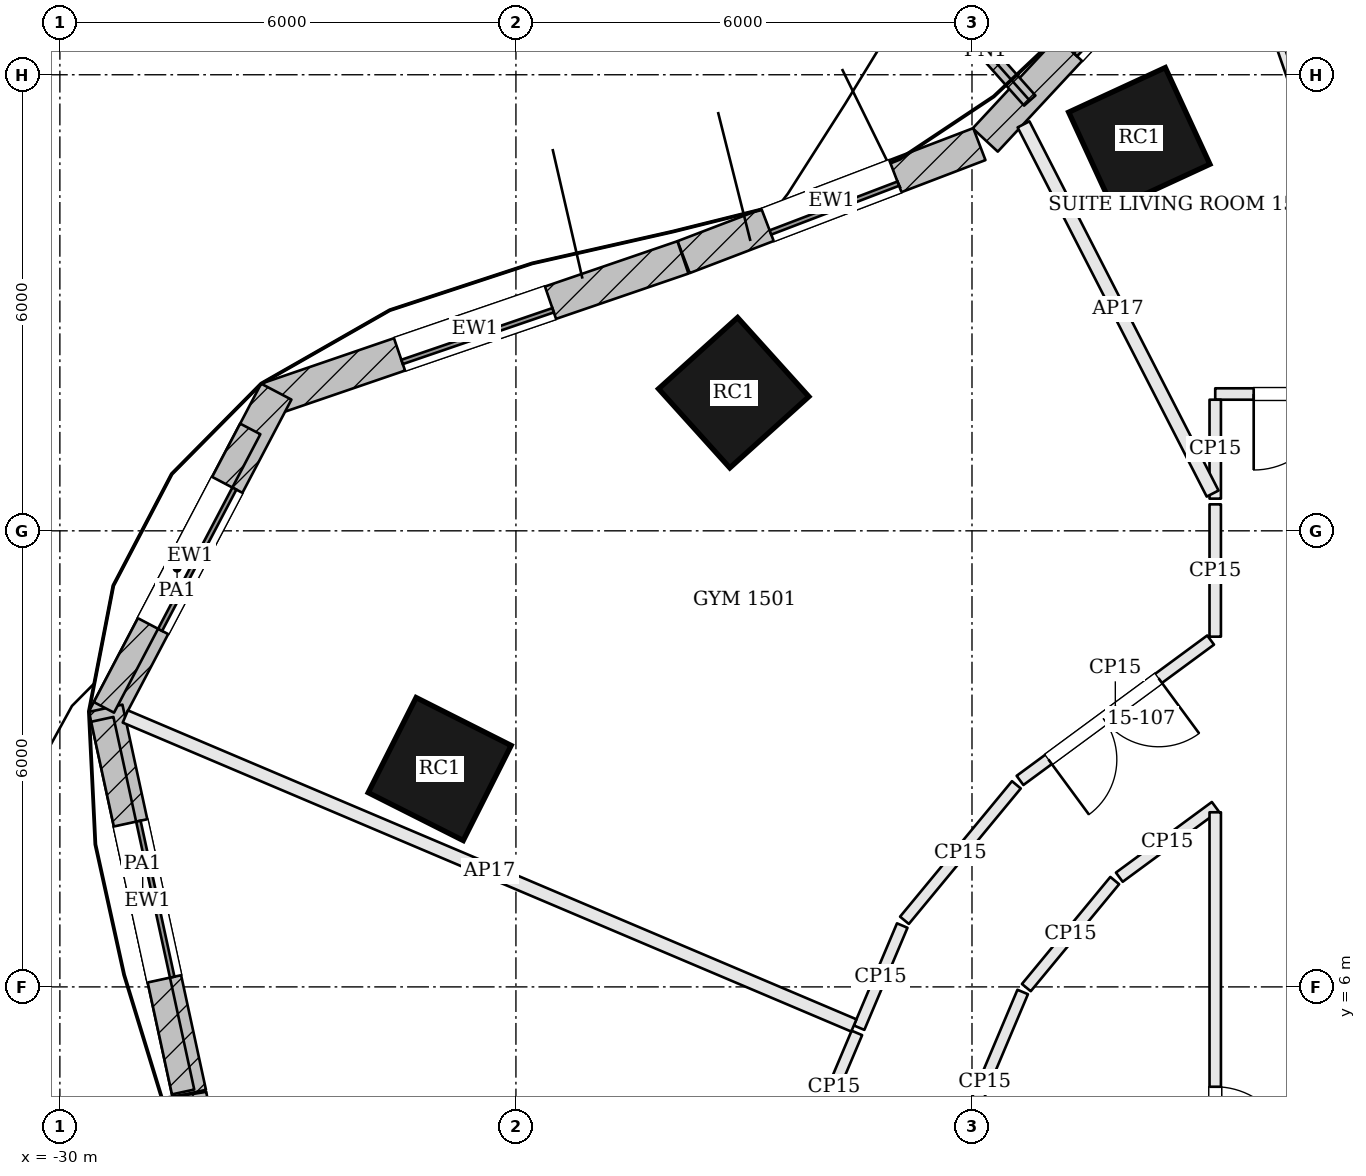
"""IFC4 building model, lengths in metres.
Left out: names, types, materials, properties, quantities, classifications, styles, units other than length and angle.
Written with IfcOpenShell. Run it as: python <this file> out.ifc"""

import sys

from ifc_helpers import new_model, si_unit, direction, frame, frame_2d, origin, origin_2d, place, context, subcontext, project, spatial, rectangle, extrude, element, fill, save


model = new_model("IFC4")
c1 = context("Model", 3, precision=1e-05, world=origin(), true_north=direction((0.0, 1.0)))
c2 = subcontext(c1, "Body", "Model", "MODEL_VIEW")
j1 = project(units=[si_unit("LENGTHUNIT", "METRE"), si_unit("PLANEANGLEUNIT", "RADIAN")], contexts=[c1])
p1 = place(None, origin())
s1 = spatial("IfcSite", under=j1, at=p1, CompositionType="ELEMENT")
p2 = place(p1, origin())
s2 = spatial("IfcBuilding", under=s1, at=p2, CompositionType="ELEMENT")
p3 = place(p2, frame((0.0, 0.0, 69.9)))
s3 = spatial("IfcBuildingStorey", under=s2, at=p3, CompositionType="ELEMENT", Elevation=69.9)
for number, where, z_axis, x_axis in (
    (1, (-15.799, 17.165, 0.0), (0.0, 0.0, 1.0), (-0.908, -0.419, 0.0)),
    (2, (-21.135, 13.817, 0.0), (0.0, 0.0, 1.0), (-0.743, -0.67, 0.0)),
    (3, (-25.003, 8.866, 0.0), (0.0, 0.0, 1.0), (-0.45, -0.893, 0.0)),
):
    element("IfcColumn", number, at=place(p3, frame(where, z_axis=z_axis, x_axis=x_axis)), inside=s3, PredefinedType="COLUMN", context=c2, shape_type="SweptSolid", body=[
        extrude(rectangle(XDim=1.4, YDim=1.4, at=origin_2d()), origin(), (0.0, 0.0, 1.0), 3.6),
    ])
p4 = place(p3, frame((-14.177, 21.066, 0.0), z_axis=(0.0, 0.0, 1.0), x_axis=(-0.680847709714, -0.732425010617, 0.0)))
e4 = element("IfcWall", 4, at=p4, inside=s3, PredefinedType="SOLIDWALL", context=c2, shape_type="SweptSolid", body=[
    extrude(rectangle(XDim=5.358, YDim=0.45, at=frame_2d((2.679, 0.0))), origin(), (0.0, 0.0, 1.0), 3.4),
])
p5 = place(p4, frame((1.629, 0.0, 0.9)))
e5 = element("IfcOpeningElement", 5, at=p5, cuts=e4, PredefinedType="OPENING", context=c2, shape_type="SweptSolid", body=[
    extrude(rectangle(XDim=2.1, YDim=2.0, at=frame_2d((1.05, 1.0))), frame((0.0, 0.235, 0.0), z_axis=(0.0, -1.0, 0.0), x_axis=(1.0, 0.0, 0.0)), (0.0, 0.0, 1.0), 0.47),
])
p6 = place(p3, frame((-17.903, 17.087, 0.0), z_axis=(0.0, 0.0, 1.0), x_axis=(-0.934145554025, -0.356892258105, 0.0)))
e6 = element("IfcWall", 6, at=p6, inside=s3, PredefinedType="SOLIDWALL", context=c2, shape_type="SweptSolid", body=[
    extrude(rectangle(XDim=4.165, YDim=0.45, at=frame_2d((2.082, 0.0))), origin(), (0.0, 0.0, 1.0), 3.4),
])
p7 = place(p6, frame((1.182, 0.0, 0.9)))
e7 = element("IfcOpeningElement", 7, at=p7, cuts=e6, PredefinedType="OPENING", context=c2, shape_type="SweptSolid", body=[
    extrude(rectangle(XDim=1.8, YDim=2.0, at=frame_2d((0.9, 1.0))), frame((0.0, 0.235, 0.0), z_axis=(0.0, -1.0, 0.0), x_axis=(1.0, 0.0, 0.0)), (0.0, 0.0, 1.0), 0.47),
])
p8 = place(p3, frame((-21.803, 15.597, 0.0), z_axis=(0.0, 0.0, 1.0), x_axis=(-0.946115314877, -0.323829910532, 0.0)))
e8 = element("IfcWall", 8, at=p8, inside=s3, PredefinedType="SOLIDWALL", context=c2, shape_type="SweptSolid", body=[
    extrude(rectangle(XDim=5.782, YDim=0.45, at=frame_2d((2.891, 0.0))), origin(), (0.0, 0.0, 1.0), 3.4),
])
p9 = place(p8, frame((1.841, 0.0, 0.9)))
e9 = element("IfcOpeningElement", 9, at=p9, cuts=e8, PredefinedType="OPENING", context=c2, shape_type="SweptSolid", body=[
    extrude(rectangle(XDim=2.1, YDim=2.0, at=frame_2d((1.05, 1.0))), frame((0.0, 0.235, 0.0), z_axis=(0.0, -1.0, 0.0), x_axis=(1.0, 0.0, 0.0)), (0.0, 0.0, 1.0), 0.47),
])
p10 = place(p3, frame((-27.153, 13.831, 0.0), z_axis=(0.0, 0.0, 1.0), x_axis=(-0.465165872942, -0.885223537108, 0.0)))
e10 = element("IfcWall", 10, at=p10, inside=s3, PredefinedType="SOLIDWALL", context=c2, shape_type="SweptSolid", body=[
    extrude(rectangle(XDim=4.871, YDim=0.45, at=frame_2d((2.436, 0.0))), origin(), (0.0, 0.0, 1.0), 3.4),
])
p11 = place(p10, frame((1.385, 0.0, 0.9)))
e11 = element("IfcOpeningElement", 11, at=p11, cuts=e10, PredefinedType="OPENING", context=c2, shape_type="SweptSolid", body=[
    extrude(rectangle(XDim=2.1, YDim=2.0, at=frame_2d((1.05, 1.0))), frame((0.0, 0.235, 0.0), z_axis=(0.0, -1.0, 0.0), x_axis=(1.0, 0.0, 0.0)), (0.0, 0.0, 1.0), 0.47),
])
p12 = place(p3, frame((-29.397, 9.666, 0.0), z_axis=(0.0, 0.0, 1.0), x_axis=(0.211962455994, -0.977277809657, 0.0)))
e12 = element("IfcWall", 12, at=p12, inside=s3, PredefinedType="SOLIDWALL", context=c2, shape_type="SweptSolid", body=[
    extrude(rectangle(XDim=5.186, YDim=0.45, at=frame_2d((2.593, 0.0))), origin(), (0.0, 0.0, 1.0), 3.4),
])
p13 = place(p12, frame((1.543, 0.0, 0.9)))
e13 = element("IfcOpeningElement", 13, at=p13, cuts=e12, PredefinedType="OPENING", context=c2, shape_type="SweptSolid", body=[
    extrude(rectangle(XDim=2.1, YDim=2.0, at=frame_2d((1.05, 1.0))), frame((0.0, 0.235, 0.0), z_axis=(0.0, -1.0, 0.0), x_axis=(1.0, 0.0, 0.0)), (0.0, 0.0, 1.0), 0.47),
])
p14 = place(p3, frame((-28.296, 4.584, 0.0), z_axis=(0.0, 0.0, 1.0), x_axis=(0.156402397796, -0.987693419014, 0.0)))
e14 = element("IfcWall", 14, at=p14, inside=s3, PredefinedType="SOLIDWALL", context=c2, shape_type="SweptSolid", body=[
    extrude(rectangle(XDim=4.276, YDim=0.45, at=frame_2d((2.138, 0.0))), origin(), (0.0, 0.0, 1.0), 3.4),
])
p15 = place(p14, frame((1.088, 0.0, 0.9)))
e15 = element("IfcOpeningElement", 15, at=p15, cuts=e14, PredefinedType="OPENING", context=c2, shape_type="SweptSolid", body=[
    extrude(rectangle(XDim=2.1, YDim=2.0, at=frame_2d((1.05, 1.0))), frame((0.0, 0.235, 0.0), z_axis=(0.0, -1.0, 0.0), x_axis=(1.0, 0.0, 0.0)), (0.0, 0.0, 1.0), 0.47),
])
p16 = place(p3, frame((-17.24, 17.66, 0.0), z_axis=(0.0, 0.0, 1.0), x_axis=(-0.664017424016, 0.747717099312, 0.0)))
e16 = element("IfcWall", 16, at=p16, inside=s3, PredefinedType="SOLIDWALL", context=c2, shape_type="SweptSolid", body=[
    extrude(rectangle(XDim=1.75, YDim=0.2, at=frame_2d((0.875, 0.0))), origin(), (0.0, 0.0, 1.0), 3.4),
])
p17 = place(p3, frame((-27.495, 13.341, 3.6), z_axis=(0.0, 0.0, 1.0), x_axis=(-0.46519687666, -0.88520724463, 0.0)))
e17 = element("IfcWall", 17, at=p17, inside=s3, PredefinedType="PARAPET", context=c2, shape_type="SweptSolid", body=[
    extrude(rectangle(XDim=4.139, YDim=0.3, at=frame_2d((2.069, 0.0))), origin(), (0.0, 0.0, 1.0), 1.1),
])
p18 = place(p3, frame((-29.442, 9.52, 3.6), z_axis=(0.0, 0.0, 1.0), x_axis=(0.211918382355, -0.977287367779, 0.0)))
e18 = element("IfcWall", 18, at=p18, inside=s3, PredefinedType="PARAPET", context=c2, shape_type="SweptSolid", body=[
    extrude(rectangle(XDim=5.016, YDim=0.3, at=frame_2d((2.508, 0.0))), origin(), (0.0, 0.0, 1.0), 1.1),
])
p19 = place(p3, frame((-28.519, 4.556, 3.6), z_axis=(0.0, 0.0, 1.0), x_axis=(0.156466543472, -0.987683259337, 0.0)))
e19 = element("IfcWall", 19, at=p19, inside=s3, PredefinedType="PARAPET", context=c2, shape_type="SweptSolid", body=[
    extrude(rectangle(XDim=1.293, YDim=0.3, at=frame_2d((0.647, 0.0))), origin(), (0.0, 0.0, 1.0), 1.1),
])
p20 = place(p3, frame((-9.594, 13.8, 0.0), z_axis=(0.0, 0.0, 1.0), x_axis=(-1.0, 0.0, 0.0)))
e20 = element("IfcWall", 20, at=p20, inside=s3, PredefinedType="PARTITIONING", context=c2, shape_type="SweptSolid", body=[
    extrude(rectangle(XDim=5.206, YDim=0.15, at=frame_2d((2.603, 0.0))), origin(), (0.0, 0.0, 1.0), 2.68),
])
p21 = place(p20, frame((3.7, 0.0, 0.0)))
e21 = element("IfcOpeningElement", 21, at=p21, cuts=e20, PredefinedType="OPENING", context=c2, shape_type="SweptSolid", body=[
    extrude(rectangle(XDim=1.0, YDim=2.1, at=frame_2d((0.5, 1.05))), frame((0.0, 0.085, 0.0), z_axis=(0.0, -1.0, 0.0), x_axis=(1.0, 0.0, 0.0)), (0.0, 0.0, 1.0), 0.17),
])
p22 = place(p3, frame((-14.8, 13.725, 0.0), z_axis=(0.0, 0.0, 1.0), x_axis=(0.0, -1.0, 0.0)))
e22 = element("IfcWall", 22, at=p22, inside=s3, PredefinedType="PARTITIONING", context=c2, shape_type="SweptSolid", body=[
    extrude(rectangle(XDim=1.302, YDim=0.15, at=frame_2d((0.651, 0.0))), origin(), (0.0, 0.0, 1.0), 2.68),
])
p23 = place(p3, frame((-17.322, 17.347, 0.0), z_axis=(0.0, 0.0, 1.0), x_axis=(0.45587154788, -0.890045578515, 0.0)))
e23 = element("IfcWall", 23, at=p23, inside=s3, PredefinedType="PARTITIONING", context=c2, shape_type="SweptSolid", body=[
    extrude(rectangle(XDim=5.457, YDim=0.175, at=frame_2d((2.729, 0.0))), origin(), (0.0, 0.0, 1.0), 2.68),
])
p24 = place(p3, frame((-14.8, 12.348, 0.0), z_axis=(0.0, 0.0, 1.0), x_axis=(0.0, -1.0, 0.0)))
e24 = element("IfcWall", 24, at=p24, inside=s3, PredefinedType="PARTITIONING", context=c2, shape_type="SweptSolid", body=[
    extrude(rectangle(XDim=1.741, YDim=0.15, at=frame_2d((0.871, 0.0))), origin(), (0.0, 0.0, 1.0), 2.68),
])
p25 = place(p3, frame((-14.861, 10.563, 0.0), z_axis=(0.0, 0.0, 1.0), x_axis=(-0.805237071219, -0.592952999094, 0.0)))
e25 = element("IfcWall", 25, at=p25, inside=s3, PredefinedType="PARTITIONING", context=c2, shape_type="SweptSolid", body=[
    extrude(rectangle(XDim=3.114, YDim=0.15, at=frame_2d((1.557, 0.0))), origin(), (0.0, 0.0, 1.0), 2.68),
])
p26 = place(p25, frame((0.85, 0.0, 0.0)))
e26 = element("IfcOpeningElement", 26, at=p26, cuts=e25, PredefinedType="OPENING", context=c2, shape_type="SweptSolid", body=[
    extrude(rectangle(XDim=1.8, YDim=2.1, at=frame_2d((0.9, 1.05))), frame((0.0, 0.085, 0.0), z_axis=(0.0, -1.0, 0.0), x_axis=(1.0, 0.0, 0.0)), (0.0, 0.0, 1.0), 0.17),
])
p27 = place(p3, frame((-17.416, 8.659, 0.0), z_axis=(0.0, 0.0, 1.0), x_axis=(-0.636865073139, -0.770975277564, 0.0)))
e27 = element("IfcWall", 27, at=p27, inside=s3, PredefinedType="PARTITIONING", context=c2, shape_type="SweptSolid", body=[
    extrude(rectangle(XDim=2.312, YDim=0.15, at=frame_2d((1.156, 0.0))), origin(), (0.0, 0.0, 1.0), 2.68),
])
p28 = place(p3, frame((-18.918, 6.807, 0.0), z_axis=(0.0, 0.0, 1.0), x_axis=(-0.38918670373, -0.921158894893, 0.0)))
e28 = element("IfcWall", 28, at=p28, inside=s3, PredefinedType="PARTITIONING", context=c2, shape_type="SweptSolid", body=[
    extrude(rectangle(XDim=1.458, YDim=0.15, at=frame_2d((0.729, 0.0))), origin(), (0.0, 0.0, 1.0), 2.68),
])
p29 = place(p3, frame((-29.139, 9.557, 0.0), z_axis=(0.0, 0.0, 1.0), x_axis=(0.920647173492, -0.390395673568, 0.0)))
e29 = element("IfcWall", 29, at=p29, inside=s3, PredefinedType="PARTITIONING", context=c2, shape_type="SweptSolid", body=[
    extrude(rectangle(XDim=10.411, YDim=0.175, at=frame_2d((5.206, 0.0))), origin(), (0.0, 0.0, 1.0), 2.68),
])
p30 = place(p3, frame((-19.514, 5.395, 0.0), z_axis=(0.0, 0.0, 1.0), x_axis=(-0.38919963173, -0.921153432747, 0.0)))
e30 = element("IfcWall", 30, at=p30, inside=s3, PredefinedType="PARTITIONING", context=c2, shape_type="SweptSolid", body=[
    extrude(rectangle(XDim=1.538, YDim=0.15, at=frame_2d((0.769, 0.0))), origin(), (0.0, 0.0, 1.0), 2.68),
])
p31 = place(p3, frame((-18.33, 3.573, 0.0), z_axis=(0.0, 0.0, 1.0), x_axis=(0.389176861346, 0.921163053207, 0.0)))
e31 = element("IfcWall", 31, at=p31, inside=s3, PredefinedType="PARTITIONING", context=c2, shape_type="SweptSolid", body=[
    extrude(rectangle(XDim=2.563, YDim=0.15, at=frame_2d((1.281, 0.0))), origin(), (0.0, 0.0, 1.0), 2.68),
])
p32 = place(p3, frame((-17.285, 5.991, 0.0), z_axis=(0.0, 0.0, 1.0), x_axis=(0.636877992195, 0.770964605581, 0.0)))
e32 = element("IfcWall", 32, at=p32, inside=s3, PredefinedType="PARTITIONING", context=c2, shape_type="SweptSolid", body=[
    extrude(rectangle(XDim=1.826, YDim=0.15, at=frame_2d((0.913, 0.0))), origin(), (0.0, 0.0, 1.0), 2.68),
])
p33 = place(p3, frame((-16.062, 7.443, 0.0), z_axis=(0.0, 0.0, 1.0), x_axis=(0.805204624788, 0.5929970592, 0.0)))
e33 = element("IfcWall", 33, at=p33, inside=s3, PredefinedType="PARTITIONING", context=c2, shape_type="SweptSolid", body=[
    extrude(rectangle(XDim=1.567, YDim=0.15, at=frame_2d((0.783, 0.0))), origin(), (0.0, 0.0, 1.0), 2.68),
])
p34 = place(p3, frame((-14.8, 8.297, 0.0), z_axis=(0.0, 0.0, 1.0), x_axis=(0.0, -1.0, 0.0)))
e34 = element("IfcWall", 34, at=p34, inside=s3, PredefinedType="PARTITIONING", context=c2, shape_type="SweptSolid", body=[
    extrude(rectangle(XDim=13.097, YDim=0.15, at=frame_2d((6.549, 0.0))), origin(), (0.0, 0.0, 1.0), 2.68),
])
p35 = place(p34, frame((3.611, 0.0, 0.0)))
e35 = element("IfcOpeningElement", 35, at=p35, cuts=e34, PredefinedType="OPENING", context=c2, shape_type="SweptSolid", body=[
    extrude(rectangle(XDim=1.0, YDim=2.1, at=frame_2d((0.5, 1.05))), frame((0.0, 0.085, 0.0), z_axis=(0.0, -1.0, 0.0), x_axis=(1.0, 0.0, 0.0)), (0.0, 0.0, 1.0), 0.17),
])
p36 = place(p3, frame((-14.603, 20.272, 0.0), z_axis=(0.0, 0.0, 1.0), x_axis=(0.327245485349, -0.94493935907, 0.0)))
e36 = element("IfcWall", 36, at=p36, inside=s3, PredefinedType="PARTITIONING", context=c2, shape_type="SweptSolid", body=[
    extrude(rectangle(XDim=6.774, YDim=0.1, at=frame_2d((3.387, 0.0))), origin(), (0.0, 0.0, 1.0), 2.898),
])
p37 = place(p36, frame((2.699, 0.0, 0.0)))
e37 = element("IfcOpeningElement", 37, at=p37, cuts=e36, PredefinedType="OPENING", context=c2, shape_type="SweptSolid", body=[
    extrude(rectangle(XDim=0.9, YDim=2.4, at=frame_2d((0.45, 1.2))), frame((0.0, 0.06, 0.0), z_axis=(0.0, -1.0, 0.0), x_axis=(1.0, 0.0, 0.0)), (0.0, 0.0, 1.0), 0.12),
])
p38 = place(p5, origin())
e38 = element("IfcWindow", 38, at=p38, inside=s3, PartitioningType="SINGLE_PANEL", PredefinedType="WINDOW", context=c2, shape_type="SweptSolid", body=[
    extrude(rectangle(XDim=2.1, YDim=2.0, at=frame_2d((1.05, 1.0))), frame((0.0, 0.135, 0.0), z_axis=(0.0, -1.0, 0.0), x_axis=(1.0, 0.0, 0.0)), (0.0, 0.0, 1.0), 0.06),
])
fill(e5, e38)
p39 = place(p7, origin())
e39 = element("IfcWindow", 39, at=p39, inside=s3, PartitioningType="SINGLE_PANEL", PredefinedType="WINDOW", context=c2, shape_type="SweptSolid", body=[
    extrude(rectangle(XDim=1.8, YDim=2.0, at=frame_2d((0.9, 1.0))), frame((0.0, 0.135, 0.0), z_axis=(0.0, -1.0, 0.0), x_axis=(1.0, 0.0, 0.0)), (0.0, 0.0, 1.0), 0.06),
])
fill(e7, e39)
p40 = place(p9, origin())
e40 = element("IfcWindow", 40, at=p40, inside=s3, PartitioningType="SINGLE_PANEL", PredefinedType="WINDOW", context=c2, shape_type="SweptSolid", body=[
    extrude(rectangle(XDim=2.1, YDim=2.0, at=frame_2d((1.05, 1.0))), frame((0.0, 0.135, 0.0), z_axis=(0.0, -1.0, 0.0), x_axis=(1.0, 0.0, 0.0)), (0.0, 0.0, 1.0), 0.06),
])
fill(e9, e40)
p41 = place(p11, origin())
e41 = element("IfcWindow", 41, at=p41, inside=s3, PartitioningType="SINGLE_PANEL", PredefinedType="WINDOW", context=c2, shape_type="SweptSolid", body=[
    extrude(rectangle(XDim=2.1, YDim=2.0, at=frame_2d((1.05, 1.0))), frame((0.0, 0.135, 0.0), z_axis=(0.0, -1.0, 0.0), x_axis=(1.0, 0.0, 0.0)), (0.0, 0.0, 1.0), 0.06),
])
fill(e11, e41)
p42 = place(p13, origin())
e42 = element("IfcWindow", 42, at=p42, inside=s3, PartitioningType="SINGLE_PANEL", PredefinedType="WINDOW", context=c2, shape_type="SweptSolid", body=[
    extrude(rectangle(XDim=2.1, YDim=2.0, at=frame_2d((1.05, 1.0))), frame((0.0, 0.135, 0.0), z_axis=(0.0, -1.0, 0.0), x_axis=(1.0, 0.0, 0.0)), (0.0, 0.0, 1.0), 0.06),
])
fill(e13, e42)
p43 = place(p21, origin())
e43 = element("IfcDoor", 43, at=p43, inside=s3, OperationType="SINGLE_SWING_RIGHT", PredefinedType="DOOR", context=c2, shape_type="SweptSolid", body=[
    extrude(rectangle(XDim=1.0, YDim=2.1, at=frame_2d((0.5, 1.05))), frame((0.0, 0.025, 0.0), z_axis=(0.0, -1.0, 0.0), x_axis=(1.0, 0.0, 0.0)), (0.0, 0.0, 1.0), 0.05),
])
fill(e21, e43)
p44 = place(p26, origin())
e44 = element("IfcDoor", 44, at=p44, inside=s3, OperationType="DOUBLE_DOOR_SINGLE_SWING", PredefinedType="DOOR", context=c2, shape_type="SweptSolid", body=[
    extrude(rectangle(XDim=1.8, YDim=2.1, at=frame_2d((0.9, 1.05))), frame((0.0, 0.025, 0.0), z_axis=(0.0, -1.0, 0.0), x_axis=(1.0, 0.0, 0.0)), (0.0, 0.0, 1.0), 0.05),
])
fill(e26, e44)
p45 = place(p35, origin())
e45 = element("IfcDoor", 45, at=p45, inside=s3, OperationType="SINGLE_SWING_RIGHT", PredefinedType="DOOR", context=c2, shape_type="SweptSolid", body=[
    extrude(rectangle(XDim=1.0, YDim=2.1, at=frame_2d((0.5, 1.05))), frame((0.0, 0.025, 0.0), z_axis=(0.0, -1.0, 0.0), x_axis=(1.0, 0.0, 0.0)), (0.0, 0.0, 1.0), 0.05),
])
fill(e35, e45)
save(model, sys.argv[1])
